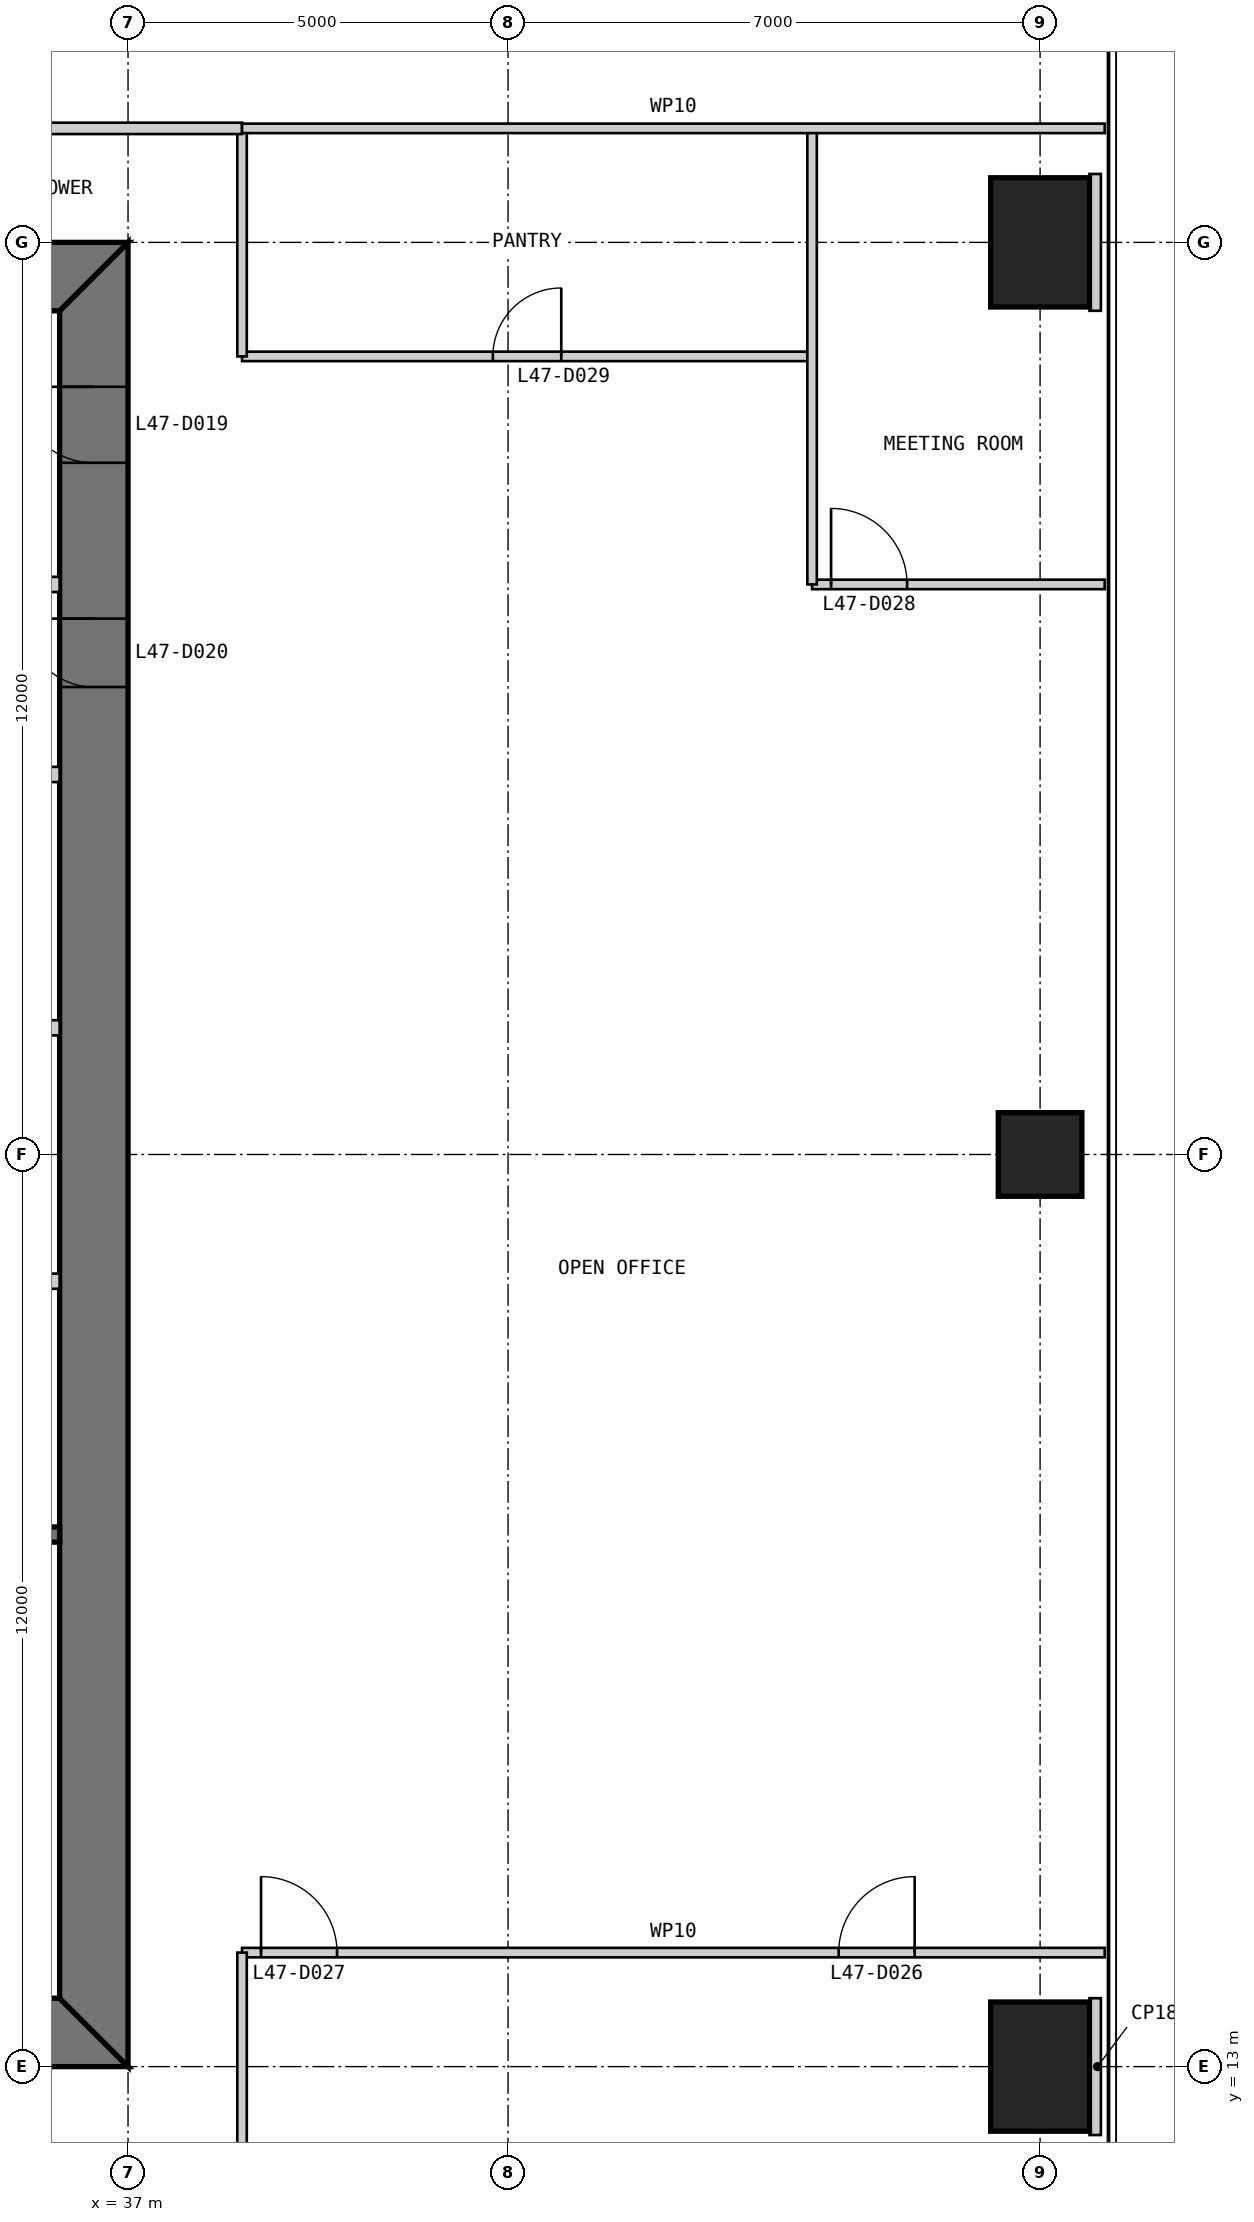
"""IFC4 building model, lengths in metres.
Left out: names, types, materials, properties, quantities, classifications, styles, units other than length and angle.
Written with IfcOpenShell. Run it as: python <this file> out.ifc"""

import sys

from ifc_helpers import new_model, si_unit, direction, frame, frame_2d, origin, origin_2d, place, context, subcontext, project, spatial, polyline, rectangle, outline, extrude, element, fill, save


model = new_model("IFC4")
c1 = context("Model", 3, precision=1e-05, world=origin(), true_north=direction((0.0, 1.0)))
c2 = subcontext(c1, "Body", "Model", "MODEL_VIEW")
j1 = project(units=[si_unit("LENGTHUNIT", "METRE"), si_unit("PLANEANGLEUNIT", "RADIAN")], contexts=[c1])
p1 = place(None, origin())
s1 = spatial("IfcSite", under=j1, at=p1, CompositionType="ELEMENT")
p2 = place(p1, origin())
s2 = spatial("IfcBuilding", under=s1, at=p2, CompositionType="ELEMENT")
p3 = place(p2, frame((0.0, 0.0, 201.8)))
s3 = spatial("IfcBuildingStorey", under=s2, at=p3, CompositionType="ELEMENT", Elevation=201.8)
p4 = place(p3, frame((49.0, 13.0, 0.0), z_axis=(0.0, 0.0, 1.0), x_axis=(1.0, 0.0, 0.0)))
e1 = element("IfcColumn", 1, at=p4, inside=s3, PredefinedType="COLUMN", context=c2, shape_type="SweptSolid", body=[
    extrude(rectangle(XDim=1.3, YDim=1.7, at=origin_2d()), origin(), (0.0, 0.0, 1.0), 4.0),
])
p5 = place(p3, frame((49.0, 25.0, 0.0), z_axis=(0.0, 0.0, 1.0), x_axis=(1.0, 0.0, 0.0)))
e2 = element("IfcColumn", 2, at=p5, inside=s3, PredefinedType="COLUMN", context=c2, shape_type="SweptSolid", body=[
    extrude(rectangle(XDim=1.1, YDim=1.1, at=origin_2d()), origin(), (0.0, 0.0, 1.0), 4.0),
])
p6 = place(p3, frame((49.0, 37.0, 0.0), z_axis=(0.0, 0.0, 1.0), x_axis=(1.0, 0.0, 0.0)))
e3 = element("IfcColumn", 3, at=p6, inside=s3, PredefinedType="COLUMN", context=c2, shape_type="SweptSolid", body=[
    extrude(rectangle(XDim=1.3, YDim=1.7, at=origin_2d()), origin(), (0.0, 0.0, 1.0), 4.0),
])
p7 = place(p3, frame((13.0, 13.45, 0.0), z_axis=(0.0, 0.0, 1.0), x_axis=(1.0, 0.0, 0.0)))
e4 = element("IfcWall", 4, at=p7, inside=s3, PredefinedType="SHEAR", context=c2, shape_type="SweptSolid", body=[
    extrude(outline(polyline([(0.0, -0.45), (24.0, -0.45), (23.1, 0.45), (0.9, 0.45), (0.0, -0.45)])), origin(), (0.0, 0.0, 1.0), 4.0),
])
p8 = place(p7, frame((4.9, 0.0, 0.0)))
e5 = element("IfcOpeningElement", 5, at=p8, cuts=e4, PredefinedType="OPENING", context=c2, shape_type="SweptSolid", body=[
    extrude(rectangle(XDim=1.0, YDim=2.2, at=frame_2d((0.5, 1.1))), frame((0.0, 0.46, 0.0), z_axis=(0.0, -1.0, 0.0), x_axis=(1.0, 0.0, 0.0)), (0.0, 0.0, 1.0), 0.92),
])
p9 = place(p7, frame((8.9, 0.0, 0.0)))
e6 = element("IfcOpeningElement", 6, at=p9, cuts=e4, PredefinedType="OPENING", context=c2, shape_type="SweptSolid", body=[
    extrude(rectangle(XDim=1.1, YDim=2.2, at=frame_2d((0.55, 1.1))), frame((0.0, 0.46, 0.0), z_axis=(0.0, -1.0, 0.0), x_axis=(1.0, 0.0, 0.0)), (0.0, 0.0, 1.0), 0.92),
])
p10 = place(p7, frame((15.05, 0.0, 0.0)))
e7 = element("IfcOpeningElement", 7, at=p10, cuts=e4, PredefinedType="OPENING", context=c2, shape_type="SweptSolid", body=[
    extrude(rectangle(XDim=0.9, YDim=2.2, at=frame_2d((0.45, 1.1))), frame((0.0, 0.46, 0.0), z_axis=(0.0, -1.0, 0.0), x_axis=(1.0, 0.0, 0.0)), (0.0, 0.0, 1.0), 0.92),
])
p11 = place(p7, frame((17.9, 0.0, 0.0)))
e8 = element("IfcOpeningElement", 8, at=p11, cuts=e4, PredefinedType="OPENING", context=c2, shape_type="SweptSolid", body=[
    extrude(rectangle(XDim=1.0, YDim=2.2, at=frame_2d((0.5, 1.1))), frame((0.0, 0.46, 0.0), z_axis=(0.0, -1.0, 0.0), x_axis=(1.0, 0.0, 0.0)), (0.0, 0.0, 1.0), 0.92),
])
p12 = place(p7, frame((21.4, 0.0, 0.0)))
e9 = element("IfcOpeningElement", 9, at=p12, cuts=e4, PredefinedType="OPENING", context=c2, shape_type="SweptSolid", body=[
    extrude(rectangle(XDim=1.0, YDim=2.2, at=frame_2d((0.5, 1.1))), frame((0.0, 0.46, 0.0), z_axis=(0.0, -1.0, 0.0), x_axis=(1.0, 0.0, 0.0)), (0.0, 0.0, 1.0), 0.92),
])
p13 = place(p3, frame((36.55, 13.9, 0.0), z_axis=(0.0, 0.0, 1.0), x_axis=(0.0, 1.0, 0.0)))
e10 = element("IfcWall", 10, at=p13, inside=s3, PredefinedType="SHEAR", context=c2, shape_type="SweptSolid", body=[
    extrude(outline(polyline([(-0.9, -0.45), (23.1, -0.45), (22.2, 0.45), (0.0, 0.45), (-0.9, -0.45)])), origin(), (0.0, 0.0, 1.0), 4.0),
])
p14 = place(p13, frame((20.2, 0.0, 0.0)))
e11 = element("IfcOpeningElement", 11, at=p14, cuts=e10, PredefinedType="OPENING", context=c2, shape_type="SweptSolid", body=[
    extrude(rectangle(XDim=1.0, YDim=2.2, at=frame_2d((0.5, 1.1))), frame((0.0, 0.46, 0.0), z_axis=(0.0, -1.0, 0.0), x_axis=(1.0, 0.0, 0.0)), (0.0, 0.0, 1.0), 0.92),
])
p15 = place(p13, frame((17.25, 0.0, 0.0)))
e12 = element("IfcOpeningElement", 12, at=p15, cuts=e10, PredefinedType="OPENING", context=c2, shape_type="SweptSolid", body=[
    extrude(rectangle(XDim=0.9, YDim=2.2, at=frame_2d((0.45, 1.1))), frame((0.0, 0.46, 0.0), z_axis=(0.0, -1.0, 0.0), x_axis=(1.0, 0.0, 0.0)), (0.0, 0.0, 1.0), 0.92),
])
p16 = place(p3, frame((37.0, 36.55, 0.0), z_axis=(0.0, 0.0, 1.0), x_axis=(-1.0, 0.0, 0.0)))
e13 = element("IfcWall", 13, at=p16, inside=s3, PredefinedType="SHEAR", context=c2, shape_type="SweptSolid", body=[
    extrude(outline(polyline([(0.0, -0.45), (24.0, -0.45), (23.1, 0.45), (0.9, 0.45), (0.0, -0.45)])), origin(), (0.0, 0.0, 1.0), 4.0),
])
p17 = place(p16, frame((4.9, 0.0, 0.0)))
e14 = element("IfcOpeningElement", 14, at=p17, cuts=e13, PredefinedType="OPENING", context=c2, shape_type="SweptSolid", body=[
    extrude(rectangle(XDim=1.0, YDim=2.2, at=frame_2d((0.5, 1.1))), frame((0.0, 0.46, 0.0), z_axis=(0.0, -1.0, 0.0), x_axis=(1.0, 0.0, 0.0)), (0.0, 0.0, 1.0), 0.92),
])
p18 = place(p16, frame((8.9, 0.0, 0.0)))
e15 = element("IfcOpeningElement", 15, at=p18, cuts=e13, PredefinedType="OPENING", context=c2, shape_type="SweptSolid", body=[
    extrude(rectangle(XDim=1.1, YDim=2.2, at=frame_2d((0.55, 1.1))), frame((0.0, 0.46, 0.0), z_axis=(0.0, -1.0, 0.0), x_axis=(1.0, 0.0, 0.0)), (0.0, 0.0, 1.0), 0.92),
])
p19 = place(p16, frame((15.05, 0.0, 0.0)))
e16 = element("IfcOpeningElement", 16, at=p19, cuts=e13, PredefinedType="OPENING", context=c2, shape_type="SweptSolid", body=[
    extrude(rectangle(XDim=0.9, YDim=2.2, at=frame_2d((0.45, 1.1))), frame((0.0, 0.46, 0.0), z_axis=(0.0, -1.0, 0.0), x_axis=(1.0, 0.0, 0.0)), (0.0, 0.0, 1.0), 0.92),
])
p20 = place(p16, frame((17.9, 0.0, 0.0)))
e17 = element("IfcOpeningElement", 17, at=p20, cuts=e13, PredefinedType="OPENING", context=c2, shape_type="SweptSolid", body=[
    extrude(rectangle(XDim=1.0, YDim=2.2, at=frame_2d((0.5, 1.1))), frame((0.0, 0.46, 0.0), z_axis=(0.0, -1.0, 0.0), x_axis=(1.0, 0.0, 0.0)), (0.0, 0.0, 1.0), 0.92),
])
p21 = place(p16, frame((21.4, 0.0, 0.0)))
e18 = element("IfcOpeningElement", 18, at=p21, cuts=e13, PredefinedType="OPENING", context=c2, shape_type="SweptSolid", body=[
    extrude(rectangle(XDim=1.0, YDim=2.2, at=frame_2d((0.5, 1.1))), frame((0.0, 0.46, 0.0), z_axis=(0.0, -1.0, 0.0), x_axis=(1.0, 0.0, 0.0)), (0.0, 0.0, 1.0), 0.92),
])
p22 = place(p3, frame((20.3, 20.0, 0.0), z_axis=(0.0, 0.0, 1.0), x_axis=(1.0, 0.0, 0.0)))
e19 = element("IfcWall", 19, at=p22, inside=s3, PredefinedType="SOLIDWALL", context=c2, shape_type="SweptSolid", body=[
    extrude(rectangle(XDim=15.8, YDim=0.2, at=frame_2d((7.9, 0.0))), origin(), (0.0, 0.0, 1.0), 3.8),
])
for number, where, z_axis, x_axis in (
    (20, (36.1, 30.0, 0.0), (0.0, 0.0, 1.0), (-1.0, 0.0, 0.0)),
    (21, (36.1, 26.667, 0.0), (0.0, 0.0, 1.0), (-1.0, 0.0, 0.0)),
    (22, (36.1, 23.333, 0.0), (0.0, 0.0, 1.0), (-1.0, 0.0, 0.0)),
    (23, (36.1, 32.5, 0.0), (0.0, 0.0, 1.0), (-1.0, 0.0, 0.0)),
):
    element("IfcWall", number, at=place(p3, frame(where, z_axis=z_axis, x_axis=x_axis)), inside=s3, PredefinedType="PARTITIONING", context=c2, shape_type="SweptSolid", body=[
        extrude(rectangle(XDim=2.8, YDim=0.2, at=frame_2d((1.4, 0.0))), origin(), (0.0, 0.0, 1.0), 3.8),
    ])
p23 = place(p3, frame((49.85, 14.5, 0.0), z_axis=(0.0, 0.0, 1.0), x_axis=(-1.0, 0.0, 0.0)))
e24 = element("IfcWall", 24, at=p23, inside=s3, PredefinedType="PARTITIONING", context=c2, shape_type="SweptSolid", body=[
    extrude(rectangle(XDim=11.35, YDim=0.125, at=frame_2d((5.675, 0.0))), origin(), (0.0, 0.0, 1.0), 3.85),
])
p24 = place(p23, frame((2.5, 0.0, 0.0)))
e25 = element("IfcOpeningElement", 25, at=p24, cuts=e24, PredefinedType="OPENING", context=c2, shape_type="SweptSolid", body=[
    extrude(rectangle(XDim=1.0, YDim=2.2, at=frame_2d((0.5, 1.1))), frame((0.0, 0.073, 0.0), z_axis=(0.0, -1.0, 0.0), x_axis=(1.0, 0.0, 0.0)), (0.0, 0.0, 1.0), 0.145),
])
p25 = place(p23, frame((10.1, 0.0, 0.0)))
e26 = element("IfcOpeningElement", 26, at=p25, cuts=e24, PredefinedType="OPENING", context=c2, shape_type="SweptSolid", body=[
    extrude(rectangle(XDim=1.0, YDim=2.2, at=frame_2d((0.5, 1.1))), frame((0.0, 0.073, 0.0), z_axis=(0.0, -1.0, 0.0), x_axis=(1.0, 0.0, 0.0)), (0.0, 0.0, 1.0), 0.145),
])
p26 = place(p3, frame((49.85, 32.5, 0.0), z_axis=(0.0, 0.0, 1.0), x_axis=(-1.0, 0.0, 0.0)))
e27 = element("IfcWall", 27, at=p26, inside=s3, PredefinedType="PARTITIONING", context=c2, shape_type="SweptSolid", body=[
    extrude(rectangle(XDim=3.85, YDim=0.125, at=frame_2d((1.925, 0.0))), origin(), (0.0, 0.0, 1.0), 3.85),
])
p27 = place(p26, frame((2.6, 0.0, 0.0)))
e28 = element("IfcOpeningElement", 28, at=p27, cuts=e27, PredefinedType="OPENING", context=c2, shape_type="SweptSolid", body=[
    extrude(rectangle(XDim=1.0, YDim=2.2, at=frame_2d((0.5, 1.1))), frame((0.0, 0.073, 0.0), z_axis=(0.0, -1.0, 0.0), x_axis=(1.0, 0.0, 0.0)), (0.0, 0.0, 1.0), 0.145),
])
p28 = place(p3, frame((46.0, 35.5, 0.0), z_axis=(0.0, 0.0, 1.0), x_axis=(-1.0, 0.0, 0.0)))
e29 = element("IfcWall", 29, at=p28, inside=s3, PredefinedType="PARTITIONING", context=c2, shape_type="SweptSolid", body=[
    extrude(rectangle(XDim=7.5, YDim=0.125, at=frame_2d((3.75, 0.0))), origin(), (0.0, 0.0, 1.0), 3.85),
])
p29 = place(p28, frame((3.3, 0.0, 0.0)))
e30 = element("IfcOpeningElement", 30, at=p29, cuts=e29, PredefinedType="OPENING", context=c2, shape_type="SweptSolid", body=[
    extrude(rectangle(XDim=0.9, YDim=2.2, at=frame_2d((0.45, 1.1))), frame((0.0, 0.073, 0.0), z_axis=(0.0, -1.0, 0.0), x_axis=(1.0, 0.0, 0.0)), (0.0, 0.0, 1.0), 0.145),
])
p30 = place(p3, frame((46.0, 32.5, 0.0), z_axis=(0.0, 0.0, 1.0), x_axis=(0.0, 1.0, 0.0)))
e31 = element("IfcWall", 31, at=p30, inside=s3, PredefinedType="PARTITIONING", context=c2, shape_type="SweptSolid", body=[
    extrude(rectangle(XDim=6.0, YDim=0.125, at=frame_2d((3.0, 0.0))), origin(), (0.0, 0.0, 1.0), 3.238),
])
for number, where, z_axis, x_axis in (
    (32, (38.5, 11.5, 0.0), (0.0, 0.0, 1.0), (0.0, 1.0, 0.0)),
    (33, (38.5, 35.5, 0.0), (0.0, 0.0, 1.0), (0.0, 1.0, 0.0)),
):
    element("IfcWall", number, at=place(p3, frame(where, z_axis=z_axis, x_axis=x_axis)), inside=s3, PredefinedType="PARTITIONING", context=c2, shape_type="SweptSolid", body=[
        extrude(rectangle(XDim=3.0, YDim=0.125, at=frame_2d((1.5, 0.0))), origin(), (0.0, 0.0, 1.0), 3.85),
    ])
p31 = place(p3, frame((38.5, 38.5, 0.0), z_axis=(0.0, 0.0, 1.0), x_axis=(-1.0, 0.0, 0.0)))
e34 = element("IfcWall", 34, at=p31, inside=s3, PredefinedType="PARTITIONING", context=c2, shape_type="SweptSolid", body=[
    extrude(rectangle(XDim=27.0, YDim=0.15, at=frame_2d((13.5, 0.0))), origin(), (0.0, 0.0, 1.0), 3.85),
])
p32 = place(p31, frame((13.0, 0.0, 0.0)))
e35 = element("IfcOpeningElement", 35, at=p32, cuts=e34, PredefinedType="OPENING", context=c2, shape_type="SweptSolid", body=[
    extrude(rectangle(XDim=1.0, YDim=2.2, at=frame_2d((0.5, 1.1))), frame((0.0, 0.085, 0.0), z_axis=(0.0, -1.0, 0.0), x_axis=(1.0, 0.0, 0.0)), (0.0, 0.0, 1.0), 0.17),
])
p33 = place(p31, frame((4.0, 0.0, 0.0)))
e36 = element("IfcOpeningElement", 36, at=p33, cuts=e34, PredefinedType="OPENING", context=c2, shape_type="SweptSolid", body=[
    extrude(rectangle(XDim=1.0, YDim=2.2, at=frame_2d((0.5, 1.1))), frame((0.0, 0.085, 0.0), z_axis=(0.0, -1.0, 0.0), x_axis=(1.0, 0.0, 0.0)), (0.0, 0.0, 1.0), 0.17),
])
p34 = place(p31, frame((22.0, 0.0, 0.0)))
e37 = element("IfcOpeningElement", 37, at=p34, cuts=e34, PredefinedType="OPENING", context=c2, shape_type="SweptSolid", body=[
    extrude(rectangle(XDim=1.0, YDim=2.2, at=frame_2d((0.5, 1.1))), frame((0.0, 0.085, 0.0), z_axis=(0.0, -1.0, 0.0), x_axis=(1.0, 0.0, 0.0)), (0.0, 0.0, 1.0), 0.17),
])
p35 = place(p31, frame((25.0, 0.0, 0.0)))
e38 = element("IfcOpeningElement", 38, at=p35, cuts=e34, PredefinedType="OPENING", context=c2, shape_type="SweptSolid", body=[
    extrude(rectangle(XDim=1.0, YDim=2.2, at=frame_2d((0.5, 1.1))), frame((0.0, 0.085, 0.0), z_axis=(0.0, -1.0, 0.0), x_axis=(1.0, 0.0, 0.0)), (0.0, 0.0, 1.0), 0.17),
])
p36 = place(p3, frame((49.85, 38.5, 0.0), z_axis=(0.0, 0.0, 1.0), x_axis=(-1.0, 0.0, 0.0)))
e39 = element("IfcWall", 39, at=p36, inside=s3, PredefinedType="PARTITIONING", context=c2, shape_type="SweptSolid", body=[
    extrude(rectangle(XDim=11.35, YDim=0.125, at=frame_2d((5.675, 0.0))), origin(), (0.0, 0.0, 1.0), 3.85),
])
for number, where, z_axis, x_axis in (
    (40, (49.8, 13.0, 0.0), (0.0, 0.0, 1.0), (-1.0, 0.0, 0.0)),
    (41, (49.8, 37.0, 0.0), (0.0, 0.0, 1.0), (-1.0, 0.0, 0.0)),
):
    element("IfcWall", number, at=place(p3, frame(where, z_axis=z_axis, x_axis=x_axis)), inside=s3, PredefinedType="PARTITIONING", context=c2, shape_type="SweptSolid", body=[
        extrude(rectangle(XDim=0.15, YDim=1.8, at=frame_2d((0.075, 0.0))), origin(), (0.0, 0.0, 1.0), 3.85),
    ])
p37 = place(p14, origin())
e42 = element("IfcDoor", 42, at=p37, inside=s3, OperationType="SINGLE_SWING_RIGHT", PredefinedType="DOOR", context=c2, shape_type="SweptSolid", body=[
    extrude(rectangle(XDim=1.0, YDim=2.2, at=frame_2d((0.5, 1.1))), frame((0.0, 0.025, 0.0), z_axis=(0.0, -1.0, 0.0), x_axis=(1.0, 0.0, 0.0)), (0.0, 0.0, 1.0), 0.05),
    extrude(outline(polyline([(0.0, 0.0), (0.04, 0.0), (0.04, 2.16), (0.96, 2.16), (0.96, 0.0), (1.0, 0.0), (1.0, 2.2), (0.0, 2.2), (0.0, 0.0)])), frame((0.0, 0.3, 0.0), z_axis=(0.0, -1.0, 0.0), x_axis=(1.0, 0.0, 0.0)), (0.0, 0.0, 1.0), 0.6),
])
fill(e11, e42)
p38 = place(p15, origin())
e43 = element("IfcDoor", 43, at=p38, inside=s3, OperationType="SINGLE_SWING_RIGHT", PredefinedType="DOOR", context=c2, shape_type="SweptSolid", body=[
    extrude(rectangle(XDim=0.9, YDim=2.2, at=frame_2d((0.45, 1.1))), frame((0.0, 0.025, 0.0), z_axis=(0.0, -1.0, 0.0), x_axis=(1.0, 0.0, 0.0)), (0.0, 0.0, 1.0), 0.05),
    extrude(outline(polyline([(0.0, 0.0), (0.04, 0.0), (0.04, 2.16), (0.86, 2.16), (0.86, 0.0), (0.9, 0.0), (0.9, 2.2), (0.0, 2.2), (0.0, 0.0)])), frame((0.0, 0.3, 0.0), z_axis=(0.0, -1.0, 0.0), x_axis=(1.0, 0.0, 0.0)), (0.0, 0.0, 1.0), 0.6),
])
fill(e12, e43)
p39 = place(p24, frame((1.0, 0.0, 0.0), z_axis=(0.0, 0.0, 1.0), x_axis=(-1.0, 0.0, 0.0)))
e44 = element("IfcDoor", 44, at=p39, inside=s3, OperationType="SINGLE_SWING_RIGHT", PredefinedType="DOOR", context=c2, shape_type="SweptSolid", body=[
    extrude(rectangle(XDim=1.0, YDim=2.2, at=frame_2d((0.5, 1.1))), frame((0.0, 0.025, 0.0), z_axis=(0.0, -1.0, 0.0), x_axis=(1.0, 0.0, 0.0)), (0.0, 0.0, 1.0), 0.05),
])
fill(e25, e44)
p40 = place(p25, frame((1.0, 0.0, 0.0), z_axis=(0.0, 0.0, 1.0), x_axis=(-1.0, 0.0, 0.0)))
e45 = element("IfcDoor", 45, at=p40, inside=s3, OperationType="SINGLE_SWING_LEFT", PredefinedType="DOOR", context=c2, shape_type="SweptSolid", body=[
    extrude(rectangle(XDim=1.0, YDim=2.2, at=frame_2d((0.5, 1.1))), frame((0.0, 0.025, 0.0), z_axis=(0.0, -1.0, 0.0), x_axis=(1.0, 0.0, 0.0)), (0.0, 0.0, 1.0), 0.05),
])
fill(e26, e45)
p41 = place(p27, frame((1.0, 0.0, 0.0), z_axis=(0.0, 0.0, 1.0), x_axis=(-1.0, 0.0, 0.0)))
e46 = element("IfcDoor", 46, at=p41, inside=s3, OperationType="SINGLE_SWING_LEFT", PredefinedType="DOOR", context=c2, shape_type="SweptSolid", body=[
    extrude(rectangle(XDim=1.0, YDim=2.2, at=frame_2d((0.5, 1.1))), frame((0.0, 0.025, 0.0), z_axis=(0.0, -1.0, 0.0), x_axis=(1.0, 0.0, 0.0)), (0.0, 0.0, 1.0), 0.05),
])
fill(e28, e46)
p42 = place(p29, frame((0.9, 0.0, 0.0), z_axis=(0.0, 0.0, 1.0), x_axis=(-1.0, 0.0, 0.0)))
e47 = element("IfcDoor", 47, at=p42, inside=s3, OperationType="SINGLE_SWING_RIGHT", PredefinedType="DOOR", context=c2, shape_type="SweptSolid", body=[
    extrude(rectangle(XDim=0.9, YDim=2.2, at=frame_2d((0.45, 1.1))), frame((0.0, 0.025, 0.0), z_axis=(0.0, -1.0, 0.0), x_axis=(1.0, 0.0, 0.0)), (0.0, 0.0, 1.0), 0.05),
])
fill(e30, e47)
save(model, sys.argv[1])
